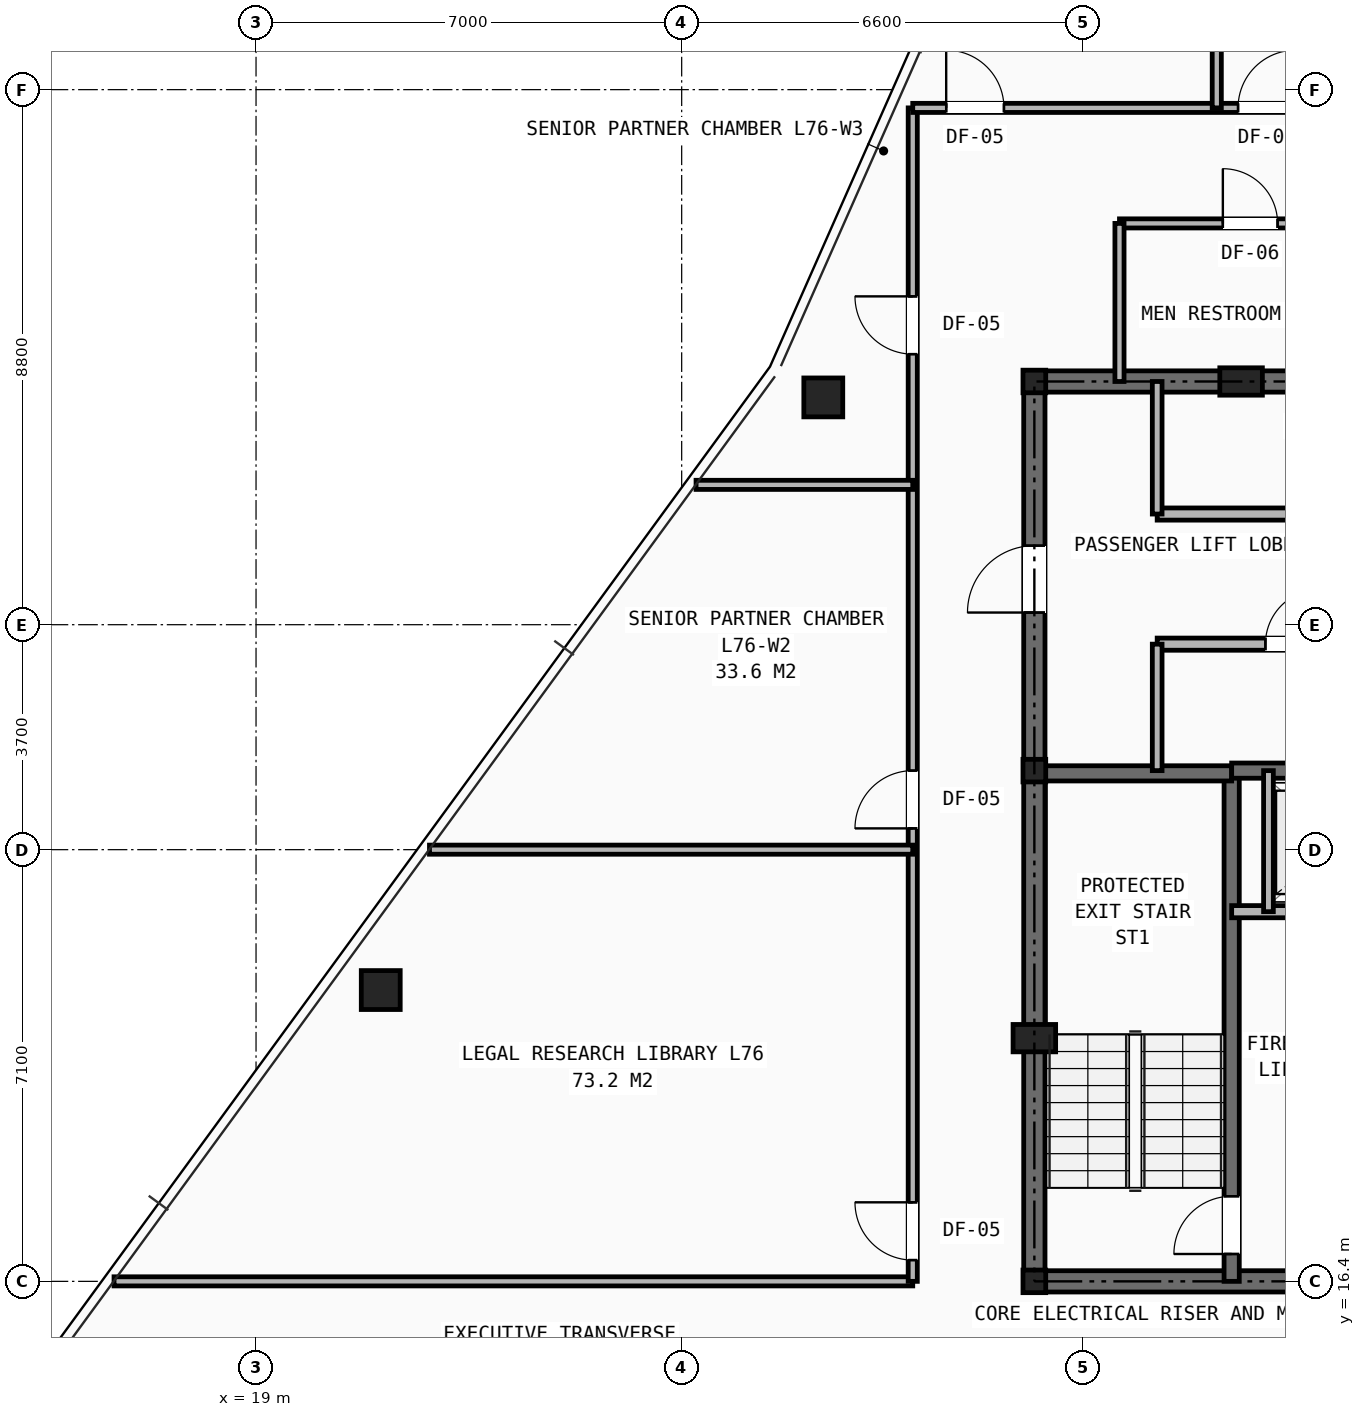
"""IFC4 building model, lengths in metres.
Left out: names, types, materials, properties, quantities, classifications, styles, units other than length and angle.
Written with IfcOpenShell. Run it as: python <this file> out.ifc"""

import sys

from ifc_helpers import new_model, si_unit, direction, frame, frame_2d, origin, origin_2d, place, context, subcontext, project, spatial, rectangle, hollow_rectangle, i_section, extrude, element, fill, save


model = new_model("IFC4")
c1 = context("Model", 3, precision=1e-05, world=origin(), true_north=direction((0.0, 1.0)))
c2 = subcontext(c1, "Body", "Model", "MODEL_VIEW")
j1 = project(units=[si_unit("LENGTHUNIT", "METRE"), si_unit("PLANEANGLEUNIT", "RADIAN")], contexts=[c1])
p1 = place(None, origin())
s1 = spatial("IfcSite", under=j1, at=p1, CompositionType="ELEMENT")
p2 = place(p1, origin())
s2 = spatial("IfcBuilding", under=s1, at=p2, CompositionType="ELEMENT")
p3 = place(p2, frame((0.0, 0.0, 269.0)))
s3 = spatial("IfcBuildingStorey", under=s2, at=p3, CompositionType="ELEMENT", Elevation=269.0)
for number, where, z_axis, x_axis in (
    (1, (31.8, 16.4, 0.0), (0.0, 0.0, 1.0), (1.0, 0.0, 0.0)),
    (2, (31.8, 24.8, 0.0), (0.0, 0.0, 1.0), (1.0, 0.0, 0.0)),
    (3, (31.8, 31.2, 0.0), (0.0, 0.0, 1.0), (1.0, 0.0, 0.0)),
):
    element("IfcColumn", number, at=place(p3, frame(where, z_axis=z_axis, x_axis=x_axis)), inside=s3, PredefinedType="COLUMN", context=c2, shape_type="SweptSolid", body=[
        extrude(i_section(OverallWidth=0.374, OverallDepth=0.372, WebThickness=0.016, FlangeThickness=0.026, at=origin_2d()), origin(), (0.0, 0.0, 1.0), 3.5),
    ])
for number, where, z_axis, x_axis in (
    (4, (31.8, 20.4, 0.0), (0.0, 0.0, 1.0), (1.0, 0.0, 0.0)),
    (5, (35.2, 31.2, 0.0), (0.0, 0.0, 1.0), (1.0, 0.0, 0.0)),
):
    element("IfcColumn", number, at=place(p3, frame(where, z_axis=z_axis, x_axis=x_axis)), inside=s3, PredefinedType="PILASTER", context=c2, shape_type="SweptSolid", body=[
        extrude(rectangle(XDim=0.7, YDim=0.45, at=origin_2d()), origin(), (0.0, 0.0, 1.0), 3.5),
    ])
for number, where, z_axis, x_axis in (
    (6, (28.329, 30.938, 0.0), (0.0, 0.0, 1.0), (1.0, 0.0, 0.0)),
    (7, (21.051, 21.191, 0.0), (0.0, 0.0, 1.0), (1.0, 0.0, 0.0)),
):
    element("IfcColumn", number, at=place(p3, frame(where, z_axis=z_axis, x_axis=x_axis)), inside=s3, PredefinedType="COLUMN", context=c2, shape_type="SweptSolid", body=[
        extrude(hollow_rectangle(XDim=0.64, YDim=0.64, WallThickness=0.045, at=origin_2d()), origin(), (0.0, 0.0, 1.0), 3.5),
    ])
p4 = place(p3, frame((31.8, 16.4, 0.0), z_axis=(0.0, 0.0, 1.0), x_axis=(1.0, 0.0, 0.0)))
e8 = element("IfcWall", 8, at=p4, inside=s3, PredefinedType="SHEAR", context=c2, shape_type="SweptSolid", body=[
    extrude(rectangle(XDim=16.4, YDim=0.35, at=frame_2d((8.2, 0.0))), origin(), (0.0, 0.0, 1.0), 3.25),
])
p5 = place(p4, frame((4.2, 0.0, 0.0)))
e9 = element("IfcOpeningElement", 9, at=p5, cuts=e8, PredefinedType="OPENING", context=c2, shape_type="SweptSolid", body=[
    extrude(rectangle(XDim=0.95, YDim=2.1, at=frame_2d((0.475, 1.05))), frame((0.0, 0.185, 0.0), z_axis=(0.0, -1.0, 0.0), x_axis=(1.0, 0.0, 0.0)), (0.0, 0.0, 1.0), 0.37),
])
p6 = place(p4, frame((10.6, 0.0, 0.0)))
e10 = element("IfcOpeningElement", 10, at=p6, cuts=e8, PredefinedType="OPENING", context=c2, shape_type="SweptSolid", body=[
    extrude(rectangle(XDim=0.95, YDim=2.1, at=frame_2d((0.475, 1.05))), frame((0.0, 0.185, 0.0), z_axis=(0.0, -1.0, 0.0), x_axis=(1.0, 0.0, 0.0)), (0.0, 0.0, 1.0), 0.37),
])
p7 = place(p3, frame((31.8, 31.2, 0.0), z_axis=(0.0, 0.0, 1.0), x_axis=(1.0, 0.0, 0.0)))
e11 = element("IfcWall", 11, at=p7, inside=s3, PredefinedType="SHEAR", context=c2, shape_type="SweptSolid", body=[
    extrude(rectangle(XDim=16.4, YDim=0.35, at=frame_2d((8.2, 0.0))), origin(), (0.0, 0.0, 1.0), 3.25),
])
p8 = place(p3, frame((31.8, 16.4, 0.0), z_axis=(0.0, 0.0, 1.0), x_axis=(0.0, 1.0, 0.0)))
e12 = element("IfcWall", 12, at=p8, inside=s3, PredefinedType="SHEAR", context=c2, shape_type="SweptSolid", body=[
    extrude(rectangle(XDim=14.8, YDim=0.35, at=frame_2d((7.4, 0.0))), origin(), (0.0, 0.0, 1.0), 3.25),
])
p9 = place(p8, frame((11.0, 0.0, 0.0)))
e13 = element("IfcOpeningElement", 13, at=p9, cuts=e12, PredefinedType="OPENING", context=c2, shape_type="SweptSolid", body=[
    extrude(rectangle(XDim=1.1, YDim=2.15, at=frame_2d((0.55, 1.075))), frame((0.0, 0.185, 0.0), z_axis=(0.0, -1.0, 0.0), x_axis=(1.0, 0.0, 0.0)), (0.0, 0.0, 1.0), 0.37),
])
p10 = place(p3, frame((35.045, 16.4, 0.0), z_axis=(0.0, 0.0, 1.0), x_axis=(0.0, 1.0, 0.0)))
e14 = element("IfcWall", 14, at=p10, inside=s3, PredefinedType="SHEAR", context=c2, shape_type="SweptSolid", body=[
    extrude(rectangle(XDim=8.4, YDim=0.25, at=frame_2d((4.2, 0.0))), origin(), (0.0, 0.0, 1.0), 3.25),
])
p11 = place(p10, frame((0.45, 0.0, 0.0)))
e15 = element("IfcOpeningElement", 15, at=p11, cuts=e14, PredefinedType="OPENING", context=c2, shape_type="SweptSolid", body=[
    extrude(rectangle(XDim=0.95, YDim=2.1, at=frame_2d((0.475, 1.05))), frame((0.0, 0.135, 0.0), z_axis=(0.0, -1.0, 0.0), x_axis=(1.0, 0.0, 0.0)), (0.0, 0.0, 1.0), 0.27),
])
p12 = place(p3, frame((31.8, 24.755, 0.0), z_axis=(0.0, 0.0, 1.0), x_axis=(1.0, 0.0, 0.0)))
e16 = element("IfcWall", 16, at=p12, inside=s3, PredefinedType="SHEAR", context=c2, shape_type="SweptSolid", body=[
    extrude(rectangle(XDim=3.245, YDim=0.25, at=frame_2d((1.623, 0.0))), origin(), (0.0, 0.0, 1.0), 3.25),
])
p13 = place(p3, frame((35.045, 24.8, 0.0), z_axis=(0.0, 0.0, 1.0), x_axis=(1.0, 0.0, 0.0)))
e17 = element("IfcWall", 17, at=p13, inside=s3, PredefinedType="SHEAR", context=c2, shape_type="SweptSolid", body=[
    extrude(rectangle(XDim=9.91, YDim=0.25, at=frame_2d((4.955, 0.0))), origin(), (0.0, 0.0, 1.0), 3.25),
])
p14 = place(p3, frame((35.045, 22.48, 0.0), z_axis=(0.0, 0.0, 1.0), x_axis=(1.0, 0.0, 0.0)))
e18 = element("IfcWall", 18, at=p14, inside=s3, PredefinedType="SOLIDWALL", context=c2, shape_type="SweptSolid", body=[
    extrude(rectangle(XDim=9.91, YDim=0.2, at=frame_2d((4.955, 0.0))), origin(), (0.0, 0.0, 1.0), 3.25),
])
p15 = place(p14, frame((1.255, 0.0, 0.0)))
e19 = element("IfcOpeningElement", 19, at=p15, cuts=e18, PredefinedType="OPENING", context=c2, shape_type="SweptSolid", body=[
    extrude(rectangle(XDim=1.1, YDim=2.15, at=frame_2d((0.55, 1.075))), frame((0.0, 0.11, 0.0), z_axis=(0.0, -1.0, 0.0), x_axis=(1.0, 0.0, 0.0)), (0.0, 0.0, 1.0), 0.22),
])
p16 = place(p14, frame((7.555, 0.0, 0.0)))
e20 = element("IfcOpeningElement", 20, at=p16, cuts=e18, PredefinedType="OPENING", context=c2, shape_type="SweptSolid", body=[
    extrude(rectangle(XDim=1.1, YDim=2.15, at=frame_2d((0.55, 1.075))), frame((0.0, 0.11, 0.0), z_axis=(0.0, -1.0, 0.0), x_axis=(1.0, 0.0, 0.0)), (0.0, 0.0, 1.0), 0.22),
])
p17 = place(p14, frame((4.405, 0.0, 0.0)))
e21 = element("IfcOpeningElement", 21, at=p17, cuts=e18, PredefinedType="OPENING", context=c2, shape_type="SweptSolid", body=[
    extrude(rectangle(XDim=1.1, YDim=2.15, at=frame_2d((0.55, 1.075))), frame((0.0, 0.11, 0.0), z_axis=(0.0, -1.0, 0.0), x_axis=(1.0, 0.0, 0.0)), (0.0, 0.0, 1.0), 0.22),
])
p18 = place(p3, frame((35.65, 22.48, 0.0), z_axis=(0.0, 0.0, 1.0), x_axis=(0.0, 1.0, 0.0)))
e22 = element("IfcWall", 22, at=p18, inside=s3, PredefinedType="SOLIDWALL", context=c2, shape_type="SweptSolid", body=[
    extrude(rectangle(XDim=2.32, YDim=0.16, at=frame_2d((1.16, 0.0))), origin(), (0.0, 0.0, 1.0), 3.25),
])
p19 = place(p3, frame((33.82, 29.02, 0.0), z_axis=(0.0, 0.0, 1.0), x_axis=(1.0, 0.0, 0.0)))
e23 = element("IfcWall", 23, at=p19, inside=s3, PredefinedType="SOLIDWALL", context=c2, shape_type="SweptSolid", body=[
    extrude(rectangle(XDim=14.38, YDim=0.2, at=frame_2d((7.19, 0.0))), origin(), (0.0, 0.0, 1.0), 2.705),
])
p20 = place(p19, frame((3.92, 0.0, 0.0)))
e24 = element("IfcOpeningElement", 24, at=p20, cuts=e23, PredefinedType="OPENING", context=c2, shape_type="SweptSolid", body=[
    extrude(rectangle(XDim=0.9, YDim=2.1, at=frame_2d((0.45, 1.05))), frame((0.0, 0.11, 0.0), z_axis=(0.0, -1.0, 0.0), x_axis=(1.0, 0.0, 0.0)), (0.0, 0.0, 1.0), 0.22),
])
p21 = place(p19, frame((9.39, 0.0, 0.0)))
e25 = element("IfcOpeningElement", 25, at=p21, cuts=e23, PredefinedType="OPENING", context=c2, shape_type="SweptSolid", body=[
    extrude(rectangle(XDim=1.1, YDim=2.15, at=frame_2d((0.55, 1.075))), frame((0.0, 0.11, 0.0), z_axis=(0.0, -1.0, 0.0), x_axis=(1.0, 0.0, 0.0)), (0.0, 0.0, 1.0), 0.22),
])
p22 = place(p19, frame((11.71, 0.0, 0.0)))
e26 = element("IfcOpeningElement", 26, at=p22, cuts=e23, PredefinedType="OPENING", context=c2, shape_type="SweptSolid", body=[
    extrude(rectangle(XDim=1.1, YDim=2.15, at=frame_2d((0.55, 1.075))), frame((0.0, 0.11, 0.0), z_axis=(0.0, -1.0, 0.0), x_axis=(1.0, 0.0, 0.0)), (0.0, 0.0, 1.0), 0.22),
])
p23 = place(p3, frame((33.82, 26.88, 0.0), z_axis=(0.0, 0.0, 1.0), x_axis=(1.0, 0.0, 0.0)))
e27 = element("IfcWall", 27, at=p23, inside=s3, PredefinedType="SOLIDWALL", context=c2, shape_type="SweptSolid", body=[
    extrude(rectangle(XDim=14.38, YDim=0.2, at=frame_2d((7.19, 0.0))), origin(), (0.0, 0.0, 1.0), 2.705),
])
p24 = place(p23, frame((1.78, 0.0, 0.0)))
e28 = element("IfcOpeningElement", 28, at=p24, cuts=e27, PredefinedType="OPENING", context=c2, shape_type="SweptSolid", body=[
    extrude(rectangle(XDim=0.9, YDim=2.1, at=frame_2d((0.45, 1.05))), frame((0.0, 0.11, 0.0), z_axis=(0.0, -1.0, 0.0), x_axis=(1.0, 0.0, 0.0)), (0.0, 0.0, 1.0), 0.22),
])
p25 = place(p23, frame((6.07, 0.0, 0.0)))
e29 = element("IfcOpeningElement", 29, at=p25, cuts=e27, PredefinedType="OPENING", context=c2, shape_type="SweptSolid", body=[
    extrude(rectangle(XDim=0.9, YDim=2.1, at=frame_2d((0.45, 1.05))), frame((0.0, 0.11, 0.0), z_axis=(0.0, -1.0, 0.0), x_axis=(1.0, 0.0, 0.0)), (0.0, 0.0, 1.0), 0.22),
])
p26 = place(p23, frame((9.39, 0.0, 0.0)))
e30 = element("IfcOpeningElement", 30, at=p26, cuts=e27, PredefinedType="OPENING", context=c2, shape_type="SweptSolid", body=[
    extrude(rectangle(XDim=1.1, YDim=2.15, at=frame_2d((0.55, 1.075))), frame((0.0, 0.11, 0.0), z_axis=(0.0, -1.0, 0.0), x_axis=(1.0, 0.0, 0.0)), (0.0, 0.0, 1.0), 0.22),
])
p27 = place(p23, frame((11.71, 0.0, 0.0)))
e31 = element("IfcOpeningElement", 31, at=p27, cuts=e27, PredefinedType="OPENING", context=c2, shape_type="SweptSolid", body=[
    extrude(rectangle(XDim=1.1, YDim=2.15, at=frame_2d((0.55, 1.075))), frame((0.0, 0.11, 0.0), z_axis=(0.0, -1.0, 0.0), x_axis=(1.0, 0.0, 0.0)), (0.0, 0.0, 1.0), 0.22),
])
p28 = place(p3, frame((33.82, 29.02, 0.0), z_axis=(0.0, 0.0, 1.0), x_axis=(0.0, 1.0, 0.0)))
e32 = element("IfcWall", 32, at=p28, inside=s3, PredefinedType="SOLIDWALL", context=c2, shape_type="SweptSolid", body=[
    extrude(rectangle(XDim=2.18, YDim=0.16, at=frame_2d((1.09, 0.0))), origin(), (0.0, 0.0, 1.0), 2.705),
])
p29 = place(p3, frame((33.82, 24.8, 0.0), z_axis=(0.0, 0.0, 1.0), x_axis=(0.0, 1.0, 0.0)))
e33 = element("IfcWall", 33, at=p29, inside=s3, PredefinedType="SOLIDWALL", context=c2, shape_type="SweptSolid", body=[
    extrude(rectangle(XDim=2.08, YDim=0.16, at=frame_2d((1.04, 0.0))), origin(), (0.0, 0.0, 1.0), 3.25),
])
p30 = place(p3, frame((33.2, 33.8, 0.0), z_axis=(0.0, 0.0, 1.0), x_axis=(1.0, 0.0, 0.0)))
e34 = element("IfcWall", 34, at=p30, inside=s3, PredefinedType="PARTITIONING", context=c2, shape_type="SweptSolid", body=[
    extrude(rectangle(XDim=13.0, YDim=0.15, at=frame_2d((6.5, 0.0))), origin(), (0.0, 0.0, 1.0), 3.25),
])
p31 = place(p30, frame((1.7, 0.0, 0.0)))
e35 = element("IfcOpeningElement", 35, at=p31, cuts=e34, PredefinedType="OPENING", context=c2, shape_type="SweptSolid", body=[
    extrude(rectangle(XDim=0.9, YDim=2.1, at=frame_2d((0.45, 1.05))), frame((0.0, 0.085, 0.0), z_axis=(0.0, -1.0, 0.0), x_axis=(1.0, 0.0, 0.0)), (0.0, 0.0, 1.0), 0.17),
])
p32 = place(p30, frame((6.0, 0.0, 0.0)))
e36 = element("IfcOpeningElement", 36, at=p32, cuts=e34, PredefinedType="OPENING", context=c2, shape_type="SweptSolid", body=[
    extrude(rectangle(XDim=0.9, YDim=2.1, at=frame_2d((0.45, 1.05))), frame((0.0, 0.085, 0.0), z_axis=(0.0, -1.0, 0.0), x_axis=(1.0, 0.0, 0.0)), (0.0, 0.0, 1.0), 0.17),
])
p33 = place(p30, frame((10.35, 0.0, 0.0)))
e37 = element("IfcOpeningElement", 37, at=p33, cuts=e34, PredefinedType="OPENING", context=c2, shape_type="SweptSolid", body=[
    extrude(rectangle(XDim=0.9, YDim=2.1, at=frame_2d((0.45, 1.05))), frame((0.0, 0.085, 0.0), z_axis=(0.0, -1.0, 0.0), x_axis=(1.0, 0.0, 0.0)), (0.0, 0.0, 1.0), 0.17),
])
p34 = place(p3, frame((33.2, 31.2, 0.0), z_axis=(0.0, 0.0, 1.0), x_axis=(0.0, 1.0, 0.0)))
e38 = element("IfcWall", 38, at=p34, inside=s3, PredefinedType="PARTITIONING", context=c2, shape_type="SweptSolid", body=[
    extrude(rectangle(XDim=2.6, YDim=0.15, at=frame_2d((1.3, 0.0))), origin(), (0.0, 0.0, 1.0), 2.705),
])
p35 = place(p3, frame((16.665, 16.4, 0.0), z_axis=(0.0, 0.0, 1.0), x_axis=(1.0, 0.0, 0.0)))
e39 = element("IfcWall", 39, at=p35, inside=s3, PredefinedType="PARTITIONING", context=c2, shape_type="SweptSolid", body=[
    extrude(rectangle(XDim=13.135, YDim=0.15, at=frame_2d((6.568, 0.0))), origin(), (0.0, 0.0, 1.0), 2.292),
])
p36 = place(p3, frame((29.8, 16.4, 0.0), z_axis=(0.0, 0.0, 1.0), x_axis=(0.0, 1.0, 0.0)))
e40 = element("IfcWall", 40, at=p36, inside=s3, PredefinedType="PARTITIONING", context=c2, shape_type="SweptSolid", body=[
    extrude(rectangle(XDim=19.3, YDim=0.15, at=frame_2d((9.65, 0.0))), origin(), (0.0, 0.0, 1.0), 2.292),
])
p37 = place(p36, frame((0.35, 0.0, 0.0)))
e41 = element("IfcOpeningElement", 41, at=p37, cuts=e40, PredefinedType="OPENING", context=c2, shape_type="SweptSolid", body=[
    extrude(rectangle(XDim=0.95, YDim=2.1, at=frame_2d((0.475, 1.05))), frame((0.0, 0.085, 0.0), z_axis=(0.0, -1.0, 0.0), x_axis=(1.0, 0.0, 0.0)), (0.0, 0.0, 1.0), 0.17),
])
p38 = place(p36, frame((7.45, 0.0, 0.0)))
e42 = element("IfcOpeningElement", 42, at=p38, cuts=e40, PredefinedType="OPENING", context=c2, shape_type="SweptSolid", body=[
    extrude(rectangle(XDim=0.95, YDim=2.1, at=frame_2d((0.475, 1.05))), frame((0.0, 0.085, 0.0), z_axis=(0.0, -1.0, 0.0), x_axis=(1.0, 0.0, 0.0)), (0.0, 0.0, 1.0), 0.17),
])
p39 = place(p36, frame((15.25, 0.0, 0.0)))
e43 = element("IfcOpeningElement", 43, at=p39, cuts=e40, PredefinedType="OPENING", context=c2, shape_type="SweptSolid", body=[
    extrude(rectangle(XDim=0.95, YDim=2.1, at=frame_2d((0.475, 1.05))), frame((0.0, 0.085, 0.0), z_axis=(0.0, -1.0, 0.0), x_axis=(1.0, 0.0, 0.0)), (0.0, 0.0, 1.0), 0.17),
])
p40 = place(p3, frame((29.8, 35.7, 0.0), z_axis=(0.0, 0.0, 1.0), x_axis=(1.0, 0.0, 0.0)))
e44 = element("IfcWall", 44, at=p40, inside=s3, PredefinedType="PARTITIONING", context=c2, shape_type="SweptSolid", body=[
    extrude(rectangle(XDim=9.45, YDim=0.15, at=frame_2d((4.725, 0.0))), origin(), (0.0, 0.0, 1.0), 2.628),
])
p41 = place(p40, frame((0.55, 0.0, 0.0)))
e45 = element("IfcOpeningElement", 45, at=p41, cuts=e44, PredefinedType="OPENING", context=c2, shape_type="SweptSolid", body=[
    extrude(rectangle(XDim=0.95, YDim=2.1, at=frame_2d((0.475, 1.05))), frame((0.0, 0.085, 0.0), z_axis=(0.0, -1.0, 0.0), x_axis=(1.0, 0.0, 0.0)), (0.0, 0.0, 1.0), 0.17),
])
p42 = place(p40, frame((5.35, 0.0, 0.0)))
e46 = element("IfcOpeningElement", 46, at=p42, cuts=e44, PredefinedType="OPENING", context=c2, shape_type="SweptSolid", body=[
    extrude(rectangle(XDim=0.95, YDim=2.1, at=frame_2d((0.475, 1.05))), frame((0.0, 0.085, 0.0), z_axis=(0.0, -1.0, 0.0), x_axis=(1.0, 0.0, 0.0)), (0.0, 0.0, 1.0), 0.17),
])
p43 = place(p3, frame((21.852, 23.5, 0.0), z_axis=(0.0, 0.0, 1.0), x_axis=(1.0, 0.0, 0.0)))
e47 = element("IfcWall", 47, at=p43, inside=s3, PredefinedType="PARTITIONING", context=c2, shape_type="SweptSolid", body=[
    extrude(rectangle(XDim=7.948, YDim=0.15, at=frame_2d((3.974, 0.0))), origin(), (0.0, 0.0, 1.0), 2.628),
])
p44 = place(p3, frame((26.236, 29.5, 0.0), z_axis=(0.0, 0.0, 1.0), x_axis=(1.0, 0.0, 0.0)))
e48 = element("IfcWall", 48, at=p44, inside=s3, PredefinedType="PARTITIONING", context=c2, shape_type="SweptSolid", body=[
    extrude(rectangle(XDim=3.564, YDim=0.15, at=frame_2d((1.782, 0.0))), origin(), (0.0, 0.0, 1.0), 2.628),
])
p45 = place(p3, frame((34.8, 35.7, 0.0), z_axis=(0.0, 0.0, 1.0), x_axis=(0.0, 1.0, 0.0)))
e49 = element("IfcWall", 49, at=p45, inside=s3, PredefinedType="PARTITIONING", context=c2, shape_type="SweptSolid", body=[
    extrude(rectangle(XDim=11.959, YDim=0.15, at=frame_2d((5.979, 0.0))), origin(), (0.0, 0.0, 1.0), 2.292),
])
p46 = place(p11, origin())
e50 = element("IfcDoor", 50, at=p46, inside=s3, OperationType="SINGLE_SWING_LEFT", PredefinedType="DOOR", context=c2, shape_type="SweptSolid", body=[
    extrude(rectangle(XDim=0.95, YDim=2.1, at=frame_2d((0.475, 1.05))), frame((0.0, 0.025, 0.0), z_axis=(0.0, -1.0, 0.0), x_axis=(1.0, 0.0, 0.0)), (0.0, 0.0, 1.0), 0.05),
])
fill(e15, e50)
p47 = place(p9, origin())
e51 = element("IfcDoor", 51, at=p47, inside=s3, OperationType="SINGLE_SWING_LEFT", PredefinedType="DOOR", context=c2, shape_type="SweptSolid", body=[
    extrude(rectangle(XDim=1.1, YDim=2.15, at=frame_2d((0.55, 1.075))), frame((0.0, 0.025, 0.0), z_axis=(0.0, -1.0, 0.0), x_axis=(1.0, 0.0, 0.0)), (0.0, 0.0, 1.0), 0.05),
])
fill(e13, e51)
p48 = place(p24, origin())
e52 = element("IfcDoor", 52, at=p48, inside=s3, OperationType="SINGLE_SWING_RIGHT", PredefinedType="DOOR", context=c2, shape_type="SweptSolid", body=[
    extrude(rectangle(XDim=0.9, YDim=2.1, at=frame_2d((0.45, 1.05))), frame((0.0, 0.025, 0.0), z_axis=(0.0, -1.0, 0.0), x_axis=(1.0, 0.0, 0.0)), (0.0, 0.0, 1.0), 0.05),
])
fill(e28, e52)
p49 = place(p31, origin())
e53 = element("IfcDoor", 53, at=p49, inside=s3, OperationType="SINGLE_SWING_LEFT", PredefinedType="DOOR", context=c2, shape_type="SweptSolid", body=[
    extrude(rectangle(XDim=0.9, YDim=2.1, at=frame_2d((0.45, 1.05))), frame((0.0, 0.025, 0.0), z_axis=(0.0, -1.0, 0.0), x_axis=(1.0, 0.0, 0.0)), (0.0, 0.0, 1.0), 0.05),
])
fill(e35, e53)
p50 = place(p37, origin())
e54 = element("IfcDoor", 54, at=p50, inside=s3, OperationType="SINGLE_SWING_RIGHT", PredefinedType="DOOR", context=c2, shape_type="SweptSolid", body=[
    extrude(rectangle(XDim=0.95, YDim=2.1, at=frame_2d((0.475, 1.05))), frame((0.0, 0.025, 0.0), z_axis=(0.0, -1.0, 0.0), x_axis=(1.0, 0.0, 0.0)), (0.0, 0.0, 1.0), 0.05),
])
fill(e41, e54)
p51 = place(p38, origin())
e55 = element("IfcDoor", 55, at=p51, inside=s3, OperationType="SINGLE_SWING_LEFT", PredefinedType="DOOR", context=c2, shape_type="SweptSolid", body=[
    extrude(rectangle(XDim=0.95, YDim=2.1, at=frame_2d((0.475, 1.05))), frame((0.0, 0.025, 0.0), z_axis=(0.0, -1.0, 0.0), x_axis=(1.0, 0.0, 0.0)), (0.0, 0.0, 1.0), 0.05),
])
fill(e42, e55)
p52 = place(p39, origin())
e56 = element("IfcDoor", 56, at=p52, inside=s3, OperationType="SINGLE_SWING_RIGHT", PredefinedType="DOOR", context=c2, shape_type="SweptSolid", body=[
    extrude(rectangle(XDim=0.95, YDim=2.1, at=frame_2d((0.475, 1.05))), frame((0.0, 0.025, 0.0), z_axis=(0.0, -1.0, 0.0), x_axis=(1.0, 0.0, 0.0)), (0.0, 0.0, 1.0), 0.05),
])
fill(e43, e56)
p53 = place(p41, origin())
e57 = element("IfcDoor", 57, at=p53, inside=s3, OperationType="SINGLE_SWING_LEFT", PredefinedType="DOOR", context=c2, shape_type="SweptSolid", body=[
    extrude(rectangle(XDim=0.95, YDim=2.1, at=frame_2d((0.475, 1.05))), frame((0.0, 0.025, 0.0), z_axis=(0.0, -1.0, 0.0), x_axis=(1.0, 0.0, 0.0)), (0.0, 0.0, 1.0), 0.05),
])
fill(e45, e57)
p54 = place(p42, origin())
e58 = element("IfcDoor", 58, at=p54, inside=s3, OperationType="SINGLE_SWING_RIGHT", PredefinedType="DOOR", context=c2, shape_type="SweptSolid", body=[
    extrude(rectangle(XDim=0.95, YDim=2.1, at=frame_2d((0.475, 1.05))), frame((0.0, 0.025, 0.0), z_axis=(0.0, -1.0, 0.0), x_axis=(1.0, 0.0, 0.0)), (0.0, 0.0, 1.0), 0.05),
])
fill(e46, e58)
save(model, sys.argv[1])
